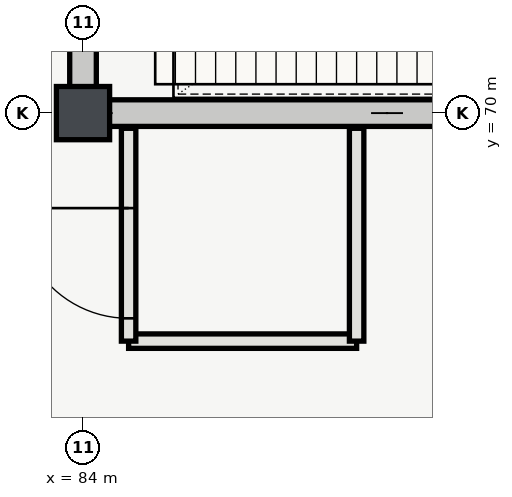
"""IFC4 building model, lengths in metres.
Left out: names, types, materials, properties, quantities, classifications, styles, units other than length and angle.
Written with IfcOpenShell. Run it as: python <this file> out.ifc"""

import sys

from ifc_helpers import new_model, si_unit, direction, frame, frame_2d, origin, origin_2d, place, context, subcontext, project, spatial, rectangle, extrude, element, fill, save


model = new_model("IFC4")
c1 = context("Model", 3, precision=1e-05, world=origin(), true_north=direction((0.0, 1.0)))
c2 = subcontext(c1, "Body", "Model", "MODEL_VIEW")
j1 = project(units=[si_unit("LENGTHUNIT", "METRE"), si_unit("PLANEANGLEUNIT", "RADIAN")], contexts=[c1])
p1 = place(None, origin())
s1 = spatial("IfcSite", under=j1, at=p1, CompositionType="ELEMENT")
p2 = place(p1, origin())
s2 = spatial("IfcBuilding", under=s1, at=p2, CompositionType="ELEMENT")
p3 = place(p2, frame((0.0, 0.0, 10.8)))
s3 = spatial("IfcBuildingStorey", under=s2, at=p3, CompositionType="ELEMENT", Elevation=10.8)
p4 = place(p3, frame((84.0, 70.0, 0.0), z_axis=(0.0, 0.0, 1.0), x_axis=(1.0, 0.0, 0.0)))
e1 = element("IfcColumn", 1, at=p4, inside=s3, PredefinedType="COLUMN", context=c2, shape_type="SweptSolid", body=[
    extrude(rectangle(XDim=0.7, YDim=0.7, at=origin_2d()), origin(), (0.0, 0.0, 1.0), 5.4),
])
p5 = place(p3, frame((83.825, 70.0, 0.0), z_axis=(0.0, 0.0, 1.0), x_axis=(1.0, 0.0, 0.0)))
e2 = element("IfcWall", 2, at=p5, inside=s3, PredefinedType="SHEAR", context=c2, shape_type="SweptSolid", body=[
    extrude(rectangle(XDim=8.35, YDim=0.35, at=frame_2d((4.175, 0.0))), origin(), (0.0, 0.0, 1.0), 5.12),
])
p6 = place(p3, frame((84.0, 70.175, 0.0), z_axis=(0.0, 0.0, 1.0), x_axis=(0.0, 1.0, 0.0)))
e3 = element("IfcWall", 3, at=p6, inside=s3, PredefinedType="SHEAR", context=c2, shape_type="SweptSolid", body=[
    extrude(rectangle(XDim=7.65, YDim=0.35, at=frame_2d((3.825, 0.0))), origin(), (0.0, 0.0, 1.0), 5.12),
])
p7 = place(p6, frame((1.65, 0.0, 0.0)))
e4 = element("IfcOpeningElement", 4, at=p7, cuts=e3, PredefinedType="OPENING", context=c2, shape_type="SweptSolid", body=[
    extrude(rectangle(XDim=1.35, YDim=2.2, at=frame_2d((0.675, 1.1))), frame((0.0, 0.185, 0.0), z_axis=(0.0, -1.0, 0.0), x_axis=(1.0, 0.0, 0.0)), (0.0, 0.0, 1.0), 0.37),
])
p8 = place(p3, frame((84.6, 67.0, 0.0), z_axis=(0.0, 0.0, 1.0), x_axis=(1.0, 0.0, 0.0)))
e5 = element("IfcWall", 5, at=p8, inside=s3, PredefinedType="PARTITIONING", context=c2, shape_type="SweptSolid", body=[
    extrude(rectangle(XDim=3.0, YDim=0.19, at=frame_2d((1.5, 0.0))), origin(), (0.0, 0.0, 1.0), 5.12),
])
p9 = place(p3, frame((84.6, 69.8, 0.0), z_axis=(0.0, 0.0, 1.0), x_axis=(0.0, -1.0, 0.0)))
e6 = element("IfcWall", 6, at=p9, inside=s3, PredefinedType="PARTITIONING", context=c2, shape_type="SweptSolid", body=[
    extrude(rectangle(XDim=2.8, YDim=0.19, at=frame_2d((1.4, 0.0))), origin(), (0.0, 0.0, 1.0), 5.12),
])
p10 = place(p9, frame((1.05, 0.0, 0.0)))
e7 = element("IfcOpeningElement", 7, at=p10, cuts=e6, PredefinedType="OPENING", context=c2, shape_type="SweptSolid", body=[
    extrude(rectangle(XDim=1.45, YDim=2.2, at=frame_2d((0.725, 1.1))), frame((0.0, 0.105, 0.0), z_axis=(0.0, -1.0, 0.0), x_axis=(1.0, 0.0, 0.0)), (0.0, 0.0, 1.0), 0.21),
])
p11 = place(p3, frame((87.6, 67.0, 0.0), z_axis=(0.0, 0.0, 1.0), x_axis=(0.0, 1.0, 0.0)))
e8 = element("IfcWall", 8, at=p11, inside=s3, PredefinedType="PARTITIONING", context=c2, shape_type="SweptSolid", body=[
    extrude(rectangle(XDim=2.8, YDim=0.19, at=frame_2d((1.4, 0.0))), origin(), (0.0, 0.0, 1.0), 5.12),
])
p12 = place(p10, origin())
e9 = element("IfcDoor", 9, at=p12, inside=s3, OperationType="SINGLE_SWING_LEFT", PredefinedType="DOOR", context=c2, shape_type="SweptSolid", body=[
    extrude(rectangle(XDim=1.45, YDim=2.2, at=frame_2d((0.725, 1.1))), frame((0.0, 0.025, 0.0), z_axis=(0.0, -1.0, 0.0), x_axis=(1.0, 0.0, 0.0)), (0.0, 0.0, 1.0), 0.05),
])
fill(e7, e9)
save(model, sys.argv[1])
